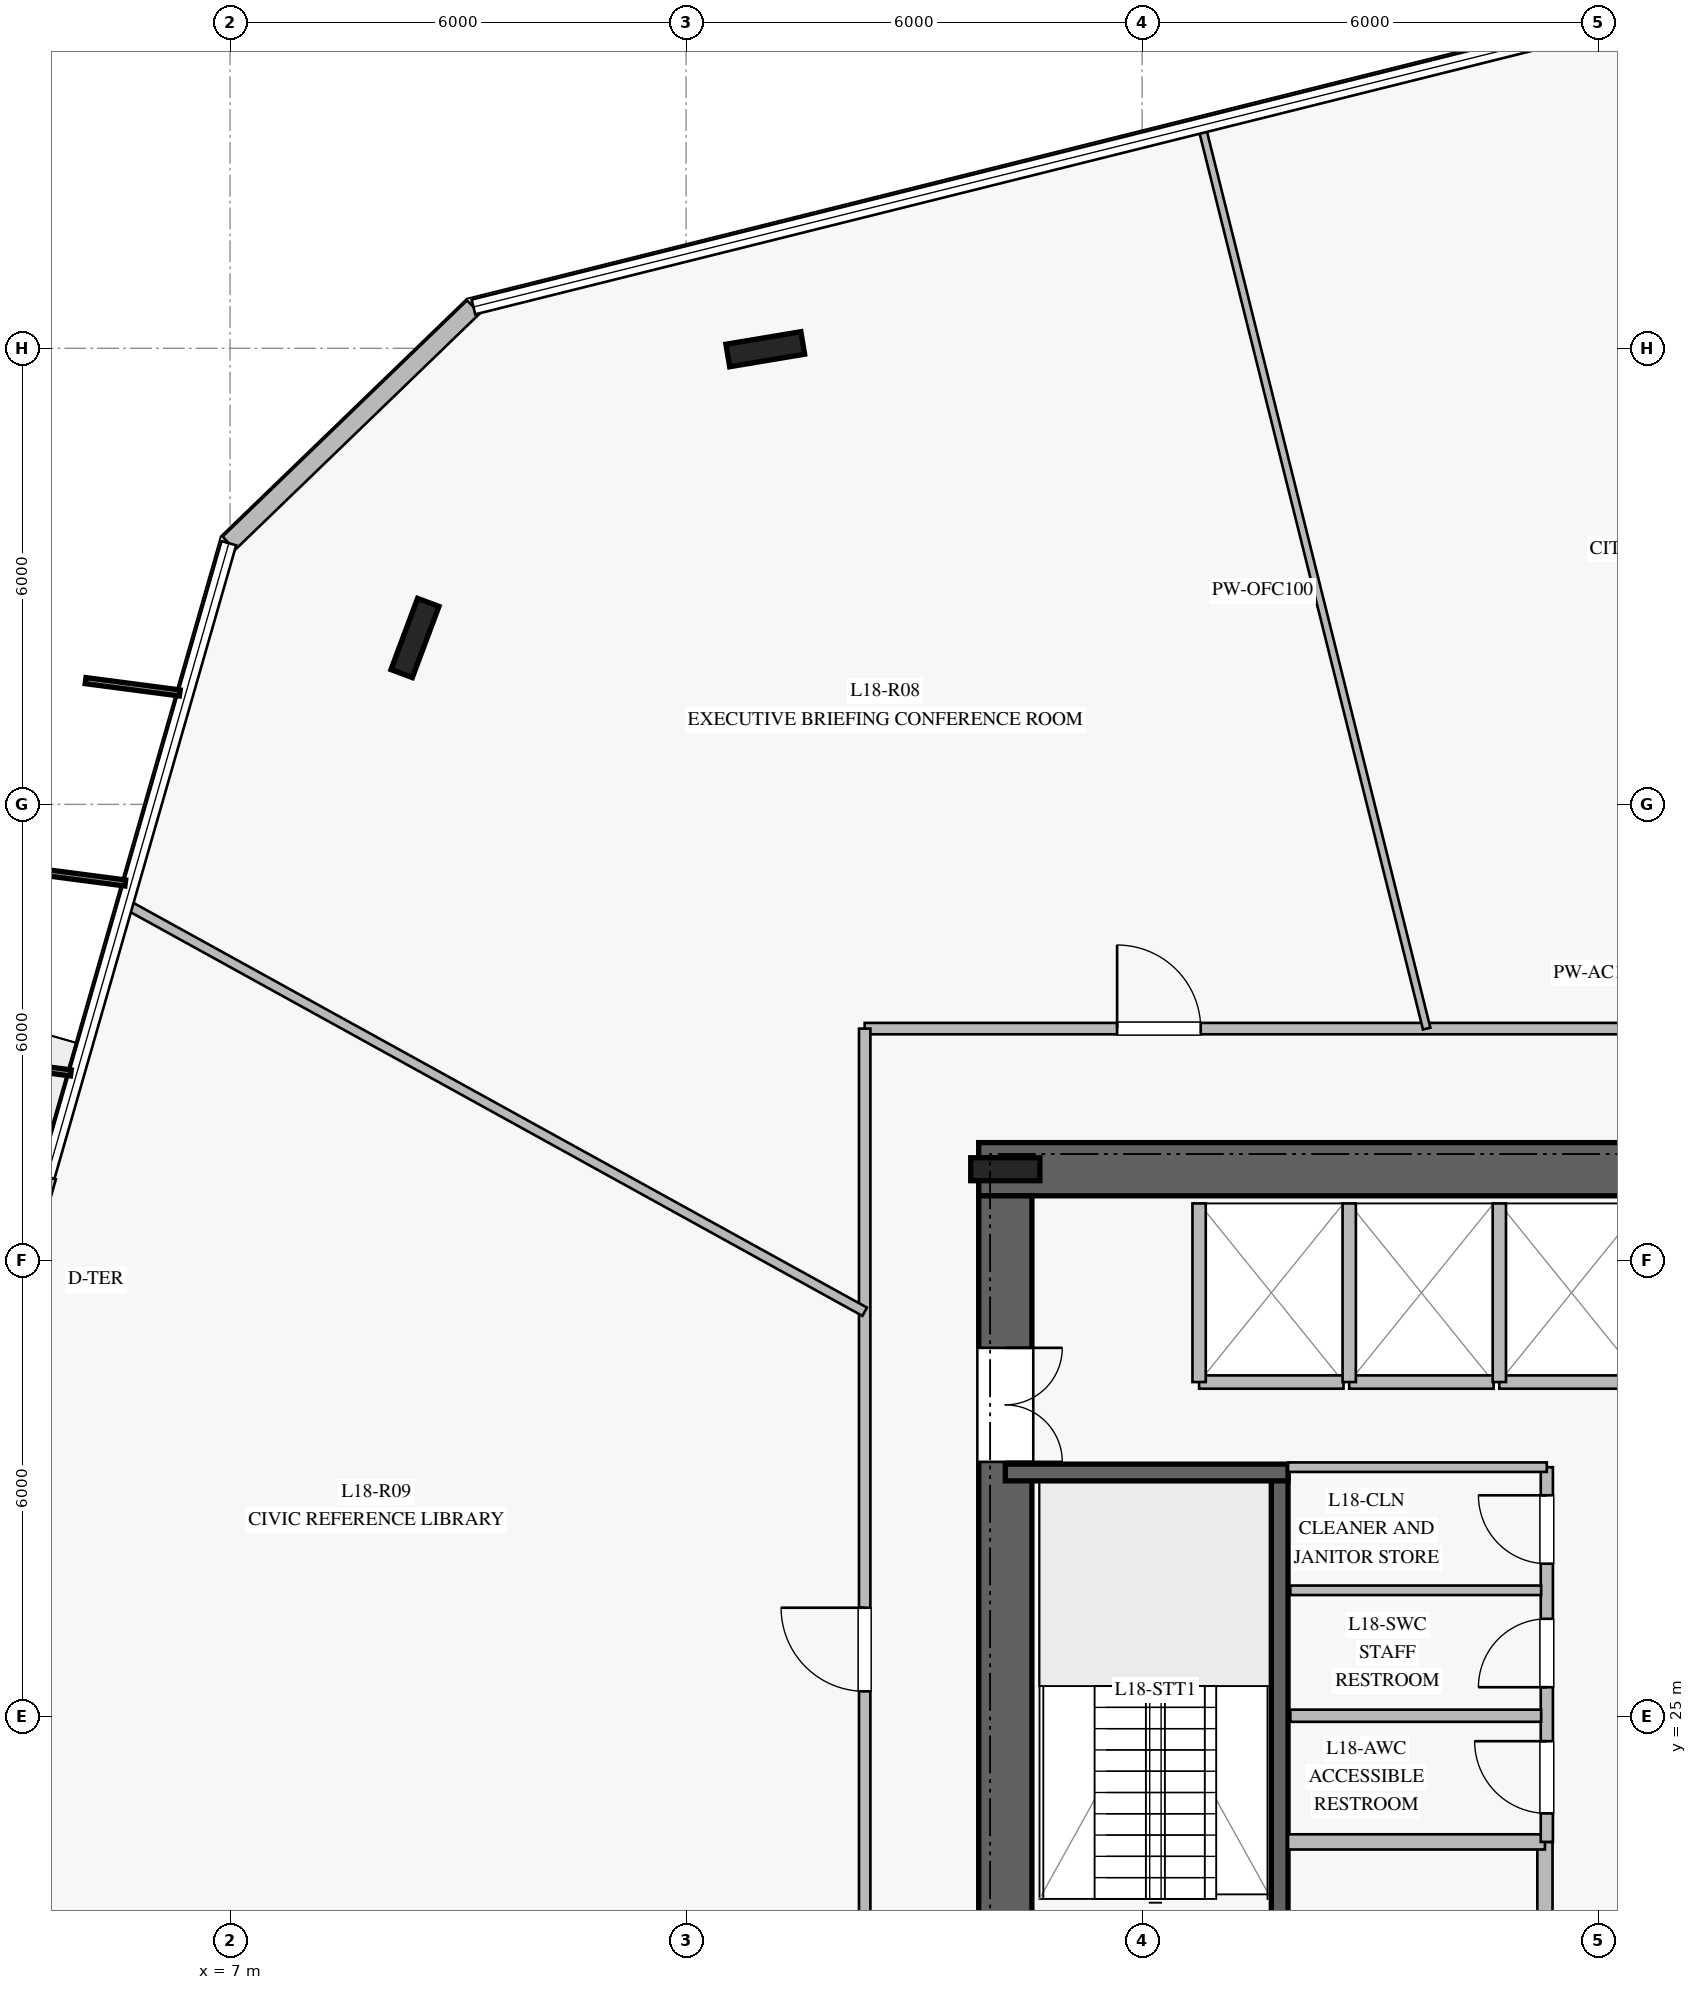
"""IFC4 building model, lengths in metres.
Left out: names, types, materials, properties, quantities, classifications, styles, units other than length and angle.
Written with IfcOpenShell. Run it as: python <this file> out.ifc"""

import sys

from ifc_helpers import new_model, si_unit, direction, frame, frame_2d, origin, origin_2d, place, context, subcontext, project, spatial, rectangle, i_section, extrude, element, fill, save


model = new_model("IFC4")
c1 = context("Model", 3, precision=1e-05, world=origin(), true_north=direction((0.0, 1.0)))
c2 = subcontext(c1, "Body", "Model", "MODEL_VIEW")
j1 = project(units=[si_unit("LENGTHUNIT", "METRE"), si_unit("PLANEANGLEUNIT", "RADIAN")], contexts=[c1])
p1 = place(None, origin())
s1 = spatial("IfcSite", under=j1, at=p1, CompositionType="ELEMENT")
p2 = place(p1, origin())
s2 = spatial("IfcBuilding", under=s1, at=p2, CompositionType="ELEMENT")
p3 = place(p2, frame((0.0, 0.0, 76.0)))
s3 = spatial("IfcBuildingStorey", under=s2, at=p3, CompositionType="ELEMENT", Elevation=76.0)
p4 = place(p3, frame((33.15, 32.2, 0.0), z_axis=(0.0, 0.0, 1.0), x_axis=(-1.0, 0.0, 0.0)))
e1 = element("IfcWall", 1, at=p4, inside=s3, PredefinedType="SHEAR", context=c2, shape_type="SweptSolid", body=[
    extrude(rectangle(XDim=16.3, YDim=0.7, at=frame_2d((8.15, 0.0))), origin(), (0.0, 0.0, 1.0), 3.76),
])
p5 = place(p4, frame((5.1, 0.0, 0.0)))
e2 = element("IfcOpeningElement", 2, at=p5, cuts=e1, PredefinedType="OPENING", context=c2, shape_type="SweptSolid", body=[
    extrude(rectangle(XDim=1.2, YDim=2.25, at=frame_2d((0.6, 1.125))), frame((0.0, 0.36, 0.0), z_axis=(0.0, -1.0, 0.0), x_axis=(1.0, 0.0, 0.0)), (0.0, 0.0, 1.0), 0.72),
])
p6 = place(p3, frame((17.2, 31.85, 0.0), z_axis=(0.0, 0.0, 1.0), x_axis=(0.0, -1.0, 0.0)))
e3 = element("IfcWall", 3, at=p6, inside=s3, PredefinedType="SHEAR", context=c2, shape_type="SweptSolid", body=[
    extrude(rectangle(XDim=13.7, YDim=0.7, at=frame_2d((6.85, 0.0))), origin(), (0.0, 0.0, 1.0), 3.76),
])
p7 = place(p6, frame((2.0, 0.0, 0.0)))
e4 = element("IfcOpeningElement", 4, at=p7, cuts=e3, PredefinedType="OPENING", context=c2, shape_type="SweptSolid", body=[
    extrude(rectangle(XDim=1.5, YDim=2.2, at=frame_2d((0.75, 1.1))), frame((0.0, 0.36, 0.0), z_axis=(0.0, -1.0, 0.0), x_axis=(1.0, 0.0, 0.0)), (0.0, 0.0, 1.0), 0.72),
])
p8 = place(p3, frame((17.2, 32.2, 0.0), z_axis=(0.0, 0.0, 1.0), x_axis=(1.0, 0.0, 0.0)))
e5 = element("IfcColumn", 5, at=p8, inside=s3, PredefinedType="COLUMN", context=c2, shape_type="SweptSolid", body=[
    extrude(i_section(OverallWidth=0.302, OverallDepth=0.91, WebThickness=0.021, FlangeThickness=0.04, at=origin_2d()), origin(), (0.0, 0.0, 1.0), 4.0),
])
p9 = place(p3, frame((20.81, 20.99, 0.0), z_axis=(0.0, 0.0, 1.0), x_axis=(0.0, 1.0, 0.0)))
e6 = element("IfcWall", 6, at=p9, inside=s3, PredefinedType="SOLIDWALL", context=c2, shape_type="SweptSolid", body=[
    extrude(rectangle(XDim=7.22, YDim=0.22, at=frame_2d((3.61, 0.0))), origin(), (0.0, 0.0, 1.0), 3.76),
])
p10 = place(p9, frame((0.18, 0.0, 0.0)))
e7 = element("IfcOpeningElement", 7, at=p10, cuts=e6, PredefinedType="OPENING", context=c2, shape_type="SweptSolid", body=[
    extrude(rectangle(XDim=1.15, YDim=2.2, at=frame_2d((0.575, 1.1))), frame((0.0, 0.12, 0.0), z_axis=(0.0, -1.0, 0.0), x_axis=(1.0, 0.0, 0.0)), (0.0, 0.0, 1.0), 0.24),
])
p11 = place(p3, frame((17.2, 28.21, 0.0), z_axis=(0.0, 0.0, 1.0), x_axis=(1.0, 0.0, 0.0)))
e8 = element("IfcWall", 8, at=p11, inside=s3, PredefinedType="SOLIDWALL", context=c2, shape_type="SweptSolid", body=[
    extrude(rectangle(XDim=3.72, YDim=0.22, at=frame_2d((1.86, 0.0))), origin(), (0.0, 0.0, 1.0), 3.76),
])
for number, where, z_axis, x_axis in (
    (9, (14.042, 42.988, 0.0), (0.0, 0.0, 1.0), (0.986, 0.165, 0.0)),
    (10, (9.433, 39.189, 0.0), (0.0, 0.0, 1.0), (0.35, 0.937, 0.0)),
):
    element("IfcColumn", number, at=place(p3, frame(where, z_axis=z_axis, x_axis=x_axis)), inside=s3, PredefinedType="COLUMN", context=c2, shape_type="SweptSolid", body=[
        extrude(i_section(OverallWidth=0.3, OverallDepth=1.0, WebThickness=0.019, FlangeThickness=0.036, at=origin_2d()), origin(), (0.0, 0.0, 1.0), 4.0),
    ])
p12 = place(p3, frame((10.202, 43.544, 0.0), z_axis=(0.0, 0.0, 1.0), x_axis=(-0.719305542435, -0.694693843806, 0.0)))
e11 = element("IfcWall", 11, at=p12, inside=s3, PredefinedType="STANDARD", context=c2, shape_type="SweptSolid", body=[
    extrude(rectangle(XDim=4.474, YDim=0.24, at=frame_2d((2.237, 0.0))), origin(), (0.0, 0.0, 1.0), 3.76),
])
p13 = place(p3, frame((4.593, 32.101, 0.0), z_axis=(0.0, 0.0, 1.0), x_axis=(-0.275473430744, -0.961308685571, 0.0)))
e12 = element("IfcWall", 12, at=p13, inside=s3, PredefinedType="STANDARD", context=c2, shape_type="SweptSolid", body=[
    extrude(rectangle(XDim=2.4, YDim=0.24, at=frame_2d((1.2, 0.0))), origin(), (0.0, 0.0, 1.0), 3.76),
])
p14 = place(p13, frame((0.4, 0.0, 0.0)))
e13 = element("IfcOpeningElement", 13, at=p14, cuts=e12, PredefinedType="OPENING", context=c2, shape_type="SweptSolid", body=[
    extrude(rectangle(XDim=1.6, YDim=2.25, at=frame_2d((0.8, 1.125))), frame((0.0, 0.13, 0.0), z_axis=(0.0, -1.0, 0.0), x_axis=(1.0, 0.0, 0.0)), (0.0, 0.0, 1.0), 0.26),
])
p15 = place(p3, frame((24.3, 18.2, 0.0), z_axis=(0.0, 0.0, 1.0), x_axis=(0.0, 1.0, 0.0)))
e14 = element("IfcWall", 14, at=p15, inside=s3, PredefinedType="PARTITIONING", context=c2, shape_type="SweptSolid", body=[
    extrude(rectangle(XDim=5.15, YDim=0.2, at=frame_2d((2.575, 0.0))), origin(), (0.0, 0.0, 1.0), 3.76),
])
p16 = place(p3, frame((20.92, 23.35, 0.0), z_axis=(0.0, 0.0, 1.0), x_axis=(1.0, 0.0, 0.0)))
e15 = element("IfcWall", 15, at=p16, inside=s3, PredefinedType="PARTITIONING", context=c2, shape_type="SweptSolid", body=[
    extrude(rectangle(XDim=3.38, YDim=0.2, at=frame_2d((1.69, 0.0))), origin(), (0.0, 0.0, 1.0), 3.76),
])
p17 = place(p3, frame((24.325, 23.35, 0.0), z_axis=(0.0, 0.0, 1.0), x_axis=(0.0, 1.0, 0.0)))
e16 = element("IfcWall", 16, at=p17, inside=s3, PredefinedType="PLUMBINGWALL", context=c2, shape_type="SweptSolid", body=[
    extrude(rectangle(XDim=4.93, YDim=0.16, at=frame_2d((2.465, 0.0))), origin(), (0.0, 0.0, 1.0), 3.76),
])
p18 = place(p17, frame((0.375, 0.0, 0.0)))
e17 = element("IfcOpeningElement", 17, at=p18, cuts=e16, PredefinedType="OPENING", context=c2, shape_type="SweptSolid", body=[
    extrude(rectangle(XDim=0.95, YDim=2.1, at=frame_2d((0.475, 1.05))), frame((0.0, 0.09, 0.0), z_axis=(0.0, -1.0, 0.0), x_axis=(1.0, 0.0, 0.0)), (0.0, 0.0, 1.0), 0.18),
])
p19 = place(p17, frame((2.035, 0.0, 0.0)))
e18 = element("IfcOpeningElement", 18, at=p19, cuts=e16, PredefinedType="OPENING", context=c2, shape_type="SweptSolid", body=[
    extrude(rectangle(XDim=0.9, YDim=2.1, at=frame_2d((0.45, 1.05))), frame((0.0, 0.09, 0.0), z_axis=(0.0, -1.0, 0.0), x_axis=(1.0, 0.0, 0.0)), (0.0, 0.0, 1.0), 0.18),
])
p20 = place(p17, frame((3.66, 0.0, 0.0)))
e19 = element("IfcOpeningElement", 19, at=p20, cuts=e16, PredefinedType="OPENING", context=c2, shape_type="SweptSolid", body=[
    extrude(rectangle(XDim=0.9, YDim=2.1, at=frame_2d((0.45, 1.05))), frame((0.0, 0.09, 0.0), z_axis=(0.0, -1.0, 0.0), x_axis=(1.0, 0.0, 0.0)), (0.0, 0.0, 1.0), 0.18),
])
p21 = place(p3, frame((20.92, 28.28, 0.0), z_axis=(0.0, 0.0, 1.0), x_axis=(1.0, 0.0, 0.0)))
e20 = element("IfcWall", 20, at=p21, inside=s3, PredefinedType="PARTITIONING", context=c2, shape_type="SweptSolid", body=[
    extrude(rectangle(XDim=3.405, YDim=0.125, at=frame_2d((1.703, 0.0))), origin(), (0.0, 0.0, 1.0), 3.76),
])
p22 = place(p3, frame((20.95, 25.01, 0.0), z_axis=(0.0, 0.0, 1.0), x_axis=(1.0, 0.0, 0.0)))
e21 = element("IfcWall", 21, at=p22, inside=s3, PredefinedType="PLUMBINGWALL", context=c2, shape_type="SweptSolid", body=[
    extrude(rectangle(XDim=3.3, YDim=0.16, at=frame_2d((1.65, 0.0))), origin(), (0.0, 0.0, 1.0), 3.76),
])
p23 = place(p3, frame((20.95, 26.66, 0.0), z_axis=(0.0, 0.0, 1.0), x_axis=(1.0, 0.0, 0.0)))
e22 = element("IfcWall", 22, at=p23, inside=s3, PredefinedType="PARTITIONING", context=c2, shape_type="SweptSolid", body=[
    extrude(rectangle(XDim=3.3, YDim=0.125, at=frame_2d((1.65, 0.0))), origin(), (0.0, 0.0, 1.0), 3.76),
])
p24 = place(p3, frame((19.75, 29.4, 0.0), z_axis=(0.0, 0.0, 1.0), x_axis=(1.0, 0.0, 0.0)))
e23 = element("IfcWall", 23, at=p24, inside=s3, PredefinedType="PARTITIONING", context=c2, shape_type="SweptSolid", body=[
    extrude(rectangle(XDim=1.9, YDim=0.175, at=frame_2d((0.95, 0.0))), origin(), (0.0, 0.0, 1.0), 3.76),
])
p25 = place(p3, frame((19.75, 29.4, 0.0), z_axis=(0.0, 0.0, 1.0), x_axis=(0.0, 1.0, 0.0)))
e24 = element("IfcWall", 24, at=p25, inside=s3, PredefinedType="PARTITIONING", context=c2, shape_type="SweptSolid", body=[
    extrude(rectangle(XDim=2.35, YDim=0.175, at=frame_2d((1.175, 0.0))), origin(), (0.0, 0.0, 1.0), 3.76),
])
p26 = place(p3, frame((21.725, 29.4, 0.0), z_axis=(0.0, 0.0, 1.0), x_axis=(1.0, 0.0, 0.0)))
e25 = element("IfcWall", 25, at=p26, inside=s3, PredefinedType="PARTITIONING", context=c2, shape_type="SweptSolid", body=[
    extrude(rectangle(XDim=1.9, YDim=0.175, at=frame_2d((0.95, 0.0))), origin(), (0.0, 0.0, 1.0), 3.76),
])
p27 = place(p3, frame((21.725, 29.4, 0.0), z_axis=(0.0, 0.0, 1.0), x_axis=(0.0, 1.0, 0.0)))
e26 = element("IfcWall", 26, at=p27, inside=s3, PredefinedType="PARTITIONING", context=c2, shape_type="SweptSolid", body=[
    extrude(rectangle(XDim=2.35, YDim=0.175, at=frame_2d((1.175, 0.0))), origin(), (0.0, 0.0, 1.0), 3.76),
])
p28 = place(p3, frame((23.7, 29.4, 0.0), z_axis=(0.0, 0.0, 1.0), x_axis=(1.0, 0.0, 0.0)))
e27 = element("IfcWall", 27, at=p28, inside=s3, PredefinedType="PARTITIONING", context=c2, shape_type="SweptSolid", body=[
    extrude(rectangle(XDim=1.9, YDim=0.175, at=frame_2d((0.95, 0.0))), origin(), (0.0, 0.0, 1.0), 3.76),
])
p29 = place(p3, frame((23.7, 29.4, 0.0), z_axis=(0.0, 0.0, 1.0), x_axis=(0.0, 1.0, 0.0)))
e28 = element("IfcWall", 28, at=p29, inside=s3, PredefinedType="PARTITIONING", context=c2, shape_type="SweptSolid", body=[
    extrude(rectangle(XDim=2.35, YDim=0.175, at=frame_2d((1.175, 0.0))), origin(), (0.0, 0.0, 1.0), 3.76),
])
p30 = place(p3, frame((15.35, 34.05, 0.0), z_axis=(0.0, 0.0, 1.0), x_axis=(1.0, 0.0, 0.0)))
e29 = element("IfcWall", 29, at=p30, inside=s3, PredefinedType="PARTITIONING", context=c2, shape_type="SweptSolid", body=[
    extrude(rectangle(XDim=19.3, YDim=0.15, at=frame_2d((9.65, 0.0))), origin(), (0.0, 0.0, 1.0), 3.21),
])
p31 = place(p30, frame((16.808, 0.0, 0.0)))
e30 = element("IfcOpeningElement", 30, at=p31, cuts=e29, PredefinedType="OPENING", context=c2, shape_type="SweptSolid", body=[
    extrude(rectangle(XDim=1.1, YDim=2.2, at=frame_2d((0.55, 1.1))), frame((0.0, 0.085, 0.0), z_axis=(0.0, -1.0, 0.0), x_axis=(1.0, 0.0, 0.0)), (0.0, 0.0, 1.0), 0.17),
])
p32 = place(p30, frame((10.941, 0.0, 0.0)))
e31 = element("IfcOpeningElement", 31, at=p32, cuts=e29, PredefinedType="OPENING", context=c2, shape_type="SweptSolid", body=[
    extrude(rectangle(XDim=1.1, YDim=2.2, at=frame_2d((0.55, 1.1))), frame((0.0, 0.085, 0.0), z_axis=(0.0, -1.0, 0.0), x_axis=(1.0, 0.0, 0.0)), (0.0, 0.0, 1.0), 0.17),
])
p33 = place(p30, frame((3.321, 0.0, 0.0)))
e32 = element("IfcOpeningElement", 32, at=p33, cuts=e29, PredefinedType="OPENING", context=c2, shape_type="SweptSolid", body=[
    extrude(rectangle(XDim=1.1, YDim=2.2, at=frame_2d((0.55, 1.1))), frame((0.0, 0.085, 0.0), z_axis=(0.0, -1.0, 0.0), x_axis=(1.0, 0.0, 0.0)), (0.0, 0.0, 1.0), 0.17),
])
p34 = place(p3, frame((15.35, 15.95, 0.0), z_axis=(0.0, 0.0, 1.0), x_axis=(0.0, 1.0, 0.0)))
e33 = element("IfcWall", 33, at=p34, inside=s3, PredefinedType="PARTITIONING", context=c2, shape_type="SweptSolid", body=[
    extrude(rectangle(XDim=18.1, YDim=0.15, at=frame_2d((9.05, 0.0))), origin(), (0.0, 0.0, 1.0), 3.21),
])
p35 = place(p34, frame((9.381, 0.0, 0.0)))
e34 = element("IfcOpeningElement", 34, at=p35, cuts=e33, PredefinedType="OPENING", context=c2, shape_type="SweptSolid", body=[
    extrude(rectangle(XDim=1.1, YDim=2.2, at=frame_2d((0.55, 1.1))), frame((0.0, 0.085, 0.0), z_axis=(0.0, -1.0, 0.0), x_axis=(1.0, 0.0, 0.0)), (0.0, 0.0, 1.0), 0.17),
])
p36 = place(p3, frame((22.744, 34.05, 0.0), z_axis=(0.0, 0.0, 1.0), x_axis=(-0.241901376607, 0.970300842005, 0.0)))
e35 = element("IfcWall", 35, at=p36, inside=s3, PredefinedType="MOVABLE", context=c2, shape_type="SweptSolid", body=[
    extrude(rectangle(XDim=12.228, YDim=0.1, at=frame_2d((6.114, 0.0))), origin(), (0.0, 0.0, 1.0), 3.06),
])
p37 = place(p3, frame((15.35, 30.325, 0.0), z_axis=(0.0, 0.0, 1.0), x_axis=(-0.875614283025, 0.483011001285, 0.0)))
e36 = element("IfcWall", 36, at=p37, inside=s3, PredefinedType="PARTITIONING", context=c2, shape_type="SweptSolid", body=[
    extrude(rectangle(XDim=11.091, YDim=0.125, at=frame_2d((5.545, 0.0))), origin(), (0.0, 0.0, 1.0), 3.06),
])
p38 = place(p7, origin())
e37 = element("IfcDoor", 37, at=p38, inside=s3, OperationType="DOUBLE_DOOR_SINGLE_SWING", PredefinedType="DOOR", context=c2, shape_type="SweptSolid", body=[
    extrude(rectangle(XDim=1.5, YDim=2.2, at=frame_2d((0.75, 1.1))), frame((0.0, 0.025, 0.0), z_axis=(0.0, -1.0, 0.0), x_axis=(1.0, 0.0, 0.0)), (0.0, 0.0, 1.0), 0.05),
])
fill(e4, e37)
p39 = place(p18, origin())
e38 = element("IfcDoor", 38, at=p39, inside=s3, OperationType="SINGLE_SWING_RIGHT", PredefinedType="DOOR", context=c2, shape_type="SweptSolid", body=[
    extrude(rectangle(XDim=0.95, YDim=2.1, at=frame_2d((0.475, 1.05))), frame((0.0, 0.025, 0.0), z_axis=(0.0, -1.0, 0.0), x_axis=(1.0, 0.0, 0.0)), (0.0, 0.0, 1.0), 0.05),
])
fill(e17, e38)
p40 = place(p19, origin())
e39 = element("IfcDoor", 39, at=p40, inside=s3, OperationType="SINGLE_SWING_LEFT", PredefinedType="DOOR", context=c2, shape_type="SweptSolid", body=[
    extrude(rectangle(XDim=0.9, YDim=2.1, at=frame_2d((0.45, 1.05))), frame((0.0, 0.025, 0.0), z_axis=(0.0, -1.0, 0.0), x_axis=(1.0, 0.0, 0.0)), (0.0, 0.0, 1.0), 0.05),
])
fill(e18, e39)
p41 = place(p20, origin())
e40 = element("IfcDoor", 40, at=p41, inside=s3, OperationType="SINGLE_SWING_RIGHT", PredefinedType="DOOR", context=c2, shape_type="SweptSolid", body=[
    extrude(rectangle(XDim=0.9, YDim=2.1, at=frame_2d((0.45, 1.05))), frame((0.0, 0.025, 0.0), z_axis=(0.0, -1.0, 0.0), x_axis=(1.0, 0.0, 0.0)), (0.0, 0.0, 1.0), 0.05),
])
fill(e19, e40)
p42 = place(p33, origin())
e41 = element("IfcDoor", 41, at=p42, inside=s3, OperationType="SINGLE_SWING_LEFT", PredefinedType="DOOR", context=c2, shape_type="SweptSolid", body=[
    extrude(rectangle(XDim=1.1, YDim=2.2, at=frame_2d((0.55, 1.1))), frame((0.0, 0.025, 0.0), z_axis=(0.0, -1.0, 0.0), x_axis=(1.0, 0.0, 0.0)), (0.0, 0.0, 1.0), 0.05),
])
fill(e32, e41)
p43 = place(p35, origin())
e42 = element("IfcDoor", 42, at=p43, inside=s3, OperationType="SINGLE_SWING_RIGHT", PredefinedType="DOOR", context=c2, shape_type="SweptSolid", body=[
    extrude(rectangle(XDim=1.1, YDim=2.2, at=frame_2d((0.55, 1.1))), frame((0.0, 0.025, 0.0), z_axis=(0.0, -1.0, 0.0), x_axis=(1.0, 0.0, 0.0)), (0.0, 0.0, 1.0), 0.05),
])
fill(e34, e42)
save(model, sys.argv[1])
